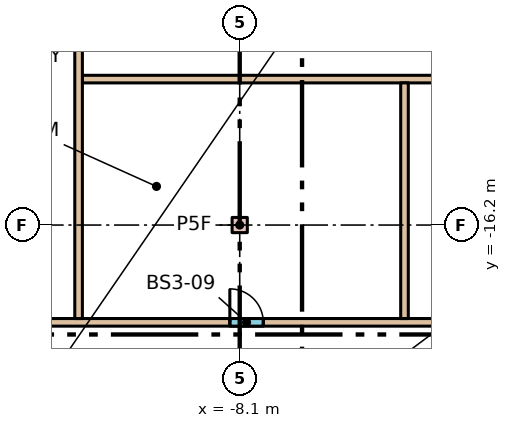
"""IFC4 building model, lengths in metres.
Left out: names, types, materials, properties, quantities, classifications, styles, units other than length and angle.
Written with IfcOpenShell. Run it as: python <this file> out.ifc"""

import sys

from ifc_helpers import new_model, si_unit, direction, frame, frame_2d, origin, origin_2d, place, context, subcontext, project, spatial, rectangle, extrude, element, fill, save


model = new_model("IFC4")
c1 = context("Model", 3, precision=1e-05, world=origin(), true_north=direction((0.0, 1.0)))
c2 = subcontext(c1, "Body", "Model", "MODEL_VIEW")
j1 = project(units=[si_unit("LENGTHUNIT", "METRE"), si_unit("PLANEANGLEUNIT", "RADIAN")], contexts=[c1])
p1 = place(None, origin())
s1 = spatial("IfcSite", under=j1, at=p1, CompositionType="ELEMENT")
p2 = place(p1, origin())
s2 = spatial("IfcBuilding", under=s1, at=p2, CompositionType="ELEMENT")
p3 = place(p2, frame((0.0, 0.0, -10.8)))
s3 = spatial("IfcBuildingStorey", under=s2, at=p3, CompositionType="ELEMENT", Elevation=-10.8)
p4 = place(p3, frame((-8.1, -16.2, 0.0), z_axis=(0.0, 0.0, 1.0), x_axis=(1.0, 0.0, 0.0)))
e1 = element("IfcColumn", 1, at=p4, inside=s3, PredefinedType="COLUMN", context=c2, shape_type="SweptSolid", body=[
    extrude(rectangle(XDim=0.5, YDim=0.5, at=origin_2d()), origin(), (0.0, 0.0, 1.0), 3.6),
])
p5 = place(p3, frame((-17.778, -19.4, 0.0), z_axis=(0.0, 0.0, 1.0), x_axis=(1.0, 0.0, 0.0)))
e2 = element("IfcWall", 2, at=p5, inside=s3, PredefinedType="PARTITIONING", context=c2, shape_type="SweptSolid", body=[
    extrude(rectangle(XDim=35.557, YDim=0.25, at=frame_2d((17.778, 0.0))), origin(), (0.0, 0.0, 1.0), 3.28),
])
p6 = place(p5, frame((9.353, 0.0, 0.0)))
e3 = element("IfcOpeningElement", 3, at=p6, cuts=e2, PredefinedType="OPENING", context=c2, shape_type="SweptSolid", body=[
    extrude(rectangle(XDim=1.1, YDim=2.1, at=frame_2d((0.55, 1.05))), frame((0.0, 0.135, 0.0), z_axis=(0.0, -1.0, 0.0), x_axis=(1.0, 0.0, 0.0)), (0.0, 0.0, 1.0), 0.27),
])
p7 = place(p5, frame((17.373, 0.0, 0.0)))
e4 = element("IfcOpeningElement", 4, at=p7, cuts=e2, PredefinedType="OPENING", context=c2, shape_type="SweptSolid", body=[
    extrude(rectangle(XDim=1.1, YDim=2.1, at=frame_2d((0.55, 1.05))), frame((0.0, 0.135, 0.0), z_axis=(0.0, -1.0, 0.0), x_axis=(1.0, 0.0, 0.0)), (0.0, 0.0, 1.0), 0.27),
])
p8 = place(p5, frame((23.633, 0.0, 0.0)))
e5 = element("IfcOpeningElement", 5, at=p8, cuts=e2, PredefinedType="OPENING", context=c2, shape_type="SweptSolid", body=[
    extrude(rectangle(XDim=1.1, YDim=2.1, at=frame_2d((0.55, 1.05))), frame((0.0, 0.135, 0.0), z_axis=(0.0, -1.0, 0.0), x_axis=(1.0, 0.0, 0.0)), (0.0, 0.0, 1.0), 0.27),
])
p9 = place(p5, frame((31.08, 0.0, 0.0)))
e6 = element("IfcOpeningElement", 6, at=p9, cuts=e2, PredefinedType="OPENING", context=c2, shape_type="SweptSolid", body=[
    extrude(rectangle(XDim=1.1, YDim=2.1, at=frame_2d((0.55, 1.05))), frame((0.0, 0.135, 0.0), z_axis=(0.0, -1.0, 0.0), x_axis=(1.0, 0.0, 0.0)), (0.0, 0.0, 1.0), 0.27),
])
p10 = place(p3, frame((-13.275, -11.4, 0.0), z_axis=(0.0, 0.0, 1.0), x_axis=(1.0, 0.0, 0.0)))
e7 = element("IfcWall", 7, at=p10, inside=s3, PredefinedType="PARTITIONING", context=c2, shape_type="SweptSolid", body=[
    extrude(rectangle(XDim=34.55, YDim=0.25, at=frame_2d((17.275, 0.0))), origin(), (0.0, 0.0, 1.0), 3.28),
])
p11 = place(p3, frame((-2.68, -19.275, 0.0), z_axis=(0.0, 0.0, 1.0), x_axis=(0.0, 1.0, 0.0)))
e8 = element("IfcWall", 8, at=p11, inside=s3, PredefinedType="PARTITIONING", context=c2, shape_type="SweptSolid", body=[
    extrude(rectangle(XDim=7.75, YDim=0.25, at=frame_2d((3.875, 0.0))), origin(), (0.0, 0.0, 1.0), 3.28),
])
p12 = place(p3, frame((-13.4, -19.275, 0.0), z_axis=(0.0, 0.0, 1.0), x_axis=(0.0, 1.0, 0.0)))
e9 = element("IfcWall", 9, at=p12, inside=s3, PredefinedType="PARTITIONING", context=c2, shape_type="SweptSolid", body=[
    extrude(rectangle(XDim=17.55, YDim=0.25, at=frame_2d((8.775, 0.0))), origin(), (0.0, 0.0, 1.0), 3.28),
])
p13 = place(p6, origin())
e10 = element("IfcDoor", 10, at=p13, inside=s3, OperationType="SINGLE_SWING_LEFT", PredefinedType="DOOR", context=c2, shape_type="SweptSolid", body=[
    extrude(rectangle(XDim=1.1, YDim=2.1, at=frame_2d((0.55, 1.05))), frame((0.0, 0.025, 0.0), z_axis=(0.0, -1.0, 0.0), x_axis=(1.0, 0.0, 0.0)), (0.0, 0.0, 1.0), 0.05),
])
fill(e3, e10)
save(model, sys.argv[1])
